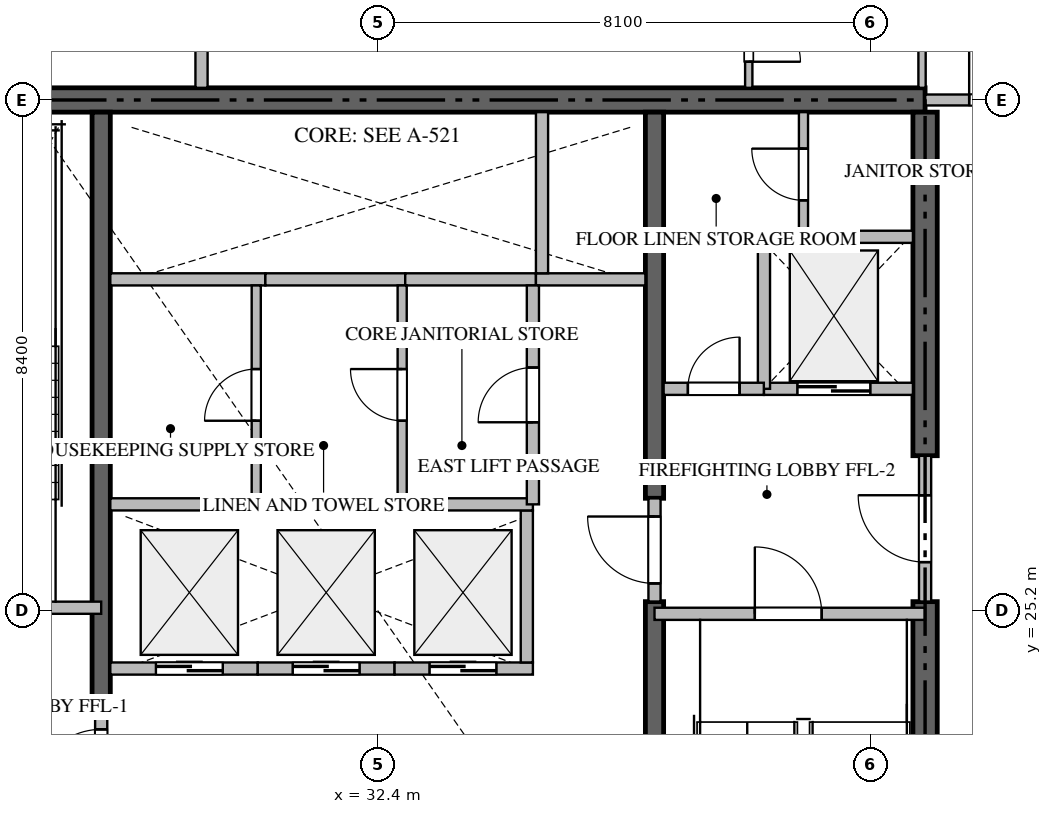
"""IFC4 building model, lengths in metres.
Left out: names, types, materials, properties, quantities, classifications, styles, units other than length and angle.
Written with IfcOpenShell. Run it as: python <this file> out.ifc"""

import sys

from ifc_helpers import new_model, si_unit, direction, frame, frame_2d, origin, place, context, subcontext, project, spatial, rectangle, extrude, source, transform, mapped, element, fill, save


model = new_model("IFC4")
c1 = context("Model", 3, precision=1e-05, world=origin(), true_north=direction((0.0, 1.0)))
c2 = subcontext(c1, "Body", "Model", "MODEL_VIEW")
j1 = project(units=[si_unit("LENGTHUNIT", "METRE"), si_unit("PLANEANGLEUNIT", "RADIAN")], contexts=[c1])
p1 = place(None, origin())
s1 = spatial("IfcSite", under=j1, at=p1, CompositionType="ELEMENT")
p2 = place(p1, origin())
s2 = spatial("IfcBuilding", under=s1, at=p2, CompositionType="ELEMENT")
p3 = place(p2, frame((0.0, 0.0, 138.9)))
s3 = spatial("IfcBuildingStorey", under=s2, at=p3, CompositionType="ELEMENT", Elevation=138.9)
p4 = place(p3, frame((41.4, 33.6, -0.26), z_axis=(0.0, 0.0, 1.0), x_axis=(-1.0, 0.0, 0.0)))
e1 = element("IfcWall", 1, at=p4, inside=s3, PredefinedType="SHEAR", context=c2, shape_type="SweptSolid", body=[
    extrude(rectangle(XDim=18.0, YDim=0.4, at=frame_2d((9.0, 0.0))), origin(), (0.0, 0.0, 1.0), 3.748),
])
p5 = place(p3, frame((41.4, 17.0, -0.26), z_axis=(0.0, 0.0, 1.0), x_axis=(0.0, 1.0, 0.0)))
e2 = element("IfcWall", 2, at=p5, inside=s3, PredefinedType="SHEAR", context=c2, shape_type="SweptSolid", body=[
    extrude(rectangle(XDim=8.35, YDim=0.4, at=frame_2d((4.175, 0.0))), origin(), (0.0, 0.0, 1.0), 3.748),
])
p6 = place(p3, frame((41.4, 27.75, -0.26), z_axis=(0.0, 0.0, 1.0), x_axis=(0.0, 1.0, 0.0)))
e3 = element("IfcWall", 3, at=p6, inside=s3, PredefinedType="SHEAR", context=c2, shape_type="SweptSolid", body=[
    extrude(rectangle(XDim=5.65, YDim=0.4, at=frame_2d((2.825, 0.0))), origin(), (0.0, 0.0, 1.0), 3.748),
])
p7 = place(p3, frame((27.85, 23.55, -0.26), z_axis=(0.0, 0.0, 1.0), x_axis=(0.0, 1.0, 0.0)))
e4 = element("IfcWall", 4, at=p7, inside=s3, PredefinedType="SHEAR", context=c2, shape_type="SweptSolid", body=[
    extrude(rectangle(XDim=9.85, YDim=0.3, at=frame_2d((4.925, 0.0))), origin(), (0.0, 0.0, 1.0), 3.748),
])
p8 = place(p3, frame((36.95, 17.0, -0.26), z_axis=(0.0, 0.0, 1.0), x_axis=(0.0, 1.0, 0.0)))
e5 = element("IfcWall", 5, at=p8, inside=s3, PredefinedType="SHEAR", context=c2, shape_type="SweptSolid", body=[
    extrude(rectangle(XDim=8.35, YDim=0.3, at=frame_2d((4.175, 0.0))), origin(), (0.0, 0.0, 1.0), 3.748),
])
p9 = place(p3, frame((36.95, 27.05, -0.26), z_axis=(0.0, 0.0, 1.0), x_axis=(0.0, 1.0, 0.0)))
e6 = element("IfcWall", 6, at=p9, inside=s3, PredefinedType="SHEAR", context=c2, shape_type="SweptSolid", body=[
    extrude(rectangle(XDim=6.35, YDim=0.3, at=frame_2d((3.175, 0.0))), origin(), (0.0, 0.0, 1.0), 3.748),
])
p10 = place(p3, frame((23.4, 25.25, 0.0), z_axis=(0.0, 0.0, 1.0), x_axis=(1.0, 0.0, 0.0)))
e7 = element("IfcWall", 7, at=p10, inside=s3, PredefinedType="STANDARD", context=c2, shape_type="SweptSolid", body=[
    extrude(rectangle(XDim=4.45, YDim=0.2, at=frame_2d((2.225, 0.0))), origin(), (0.0, 0.0, 1.0), 3.49),
])
p11 = place(p10, frame((1.65, 0.0, 0.0)))
e8 = element("IfcOpeningElement", 8, at=p11, cuts=e7, PredefinedType="OPENING", context=c2, shape_type="SweptSolid", body=[
    extrude(rectangle(XDim=1.1, YDim=2.15, at=frame_2d((0.55, 1.075))), frame((0.0, 0.11, 0.0), z_axis=(0.0, -1.0, 0.0), x_axis=(1.0, 0.0, 0.0)), (0.0, 0.0, 1.0), 0.22),
])
p12 = place(p3, frame((36.95, 25.15, 0.0), z_axis=(0.0, 0.0, 1.0), x_axis=(1.0, 0.0, 0.0)))
e9 = element("IfcWall", 9, at=p12, inside=s3, PredefinedType="STANDARD", context=c2, shape_type="SweptSolid", body=[
    extrude(rectangle(XDim=4.45, YDim=0.2, at=frame_2d((2.225, 0.0))), origin(), (0.0, 0.0, 1.0), 3.49),
])
p13 = place(p12, frame((1.65, 0.0, 0.0)))
e10 = element("IfcOpeningElement", 10, at=p13, cuts=e9, PredefinedType="OPENING", context=c2, shape_type="SweptSolid", body=[
    extrude(rectangle(XDim=1.1, YDim=2.15, at=frame_2d((0.55, 1.075))), frame((0.0, 0.11, 0.0), z_axis=(0.0, -1.0, 0.0), x_axis=(1.0, 0.0, 0.0)), (0.0, 0.0, 1.0), 0.22),
])
p14 = place(p3, frame((38.75, 28.85, 0.0), z_axis=(0.0, 0.0, 1.0), x_axis=(1.0, 0.0, 0.0)))
e11 = element("IfcWall", 11, at=p14, inside=s3, PredefinedType="STANDARD", context=c2, shape_type="SweptSolid", body=[
    extrude(rectangle(XDim=2.45, YDim=0.2, at=frame_2d((1.225, 0.0))), origin(), (0.0, 0.0, 1.0), 3.49),
])
p15 = place(p14, frame((0.55, 0.0, 0.0)))
e12 = element("IfcOpeningElement", 12, at=p15, cuts=e11, PredefinedType="OPENING", context=c2, shape_type="SweptSolid", body=[
    extrude(rectangle(XDim=1.2, YDim=2.2, at=frame_2d((0.6, 1.1))), frame((0.0, 0.11, 0.0), z_axis=(0.0, -1.0, 0.0), x_axis=(1.0, 0.0, 0.0)), (0.0, 0.0, 1.0), 0.22),
])
p16 = place(p3, frame((28.0, 24.25, 0.0), z_axis=(0.0, 0.0, 1.0), x_axis=(1.0, 0.0, 0.0)))
e13 = element("IfcWall", 13, at=p16, inside=s3, PredefinedType="STANDARD", context=c2, shape_type="SweptSolid", body=[
    extrude(rectangle(XDim=2.425, YDim=0.2, at=frame_2d((1.212, 0.0))), origin(), (0.0, 0.0, 1.0), 3.49),
])
p17 = place(p16, frame((0.75, 0.0, 0.0)))
e14 = element("IfcOpeningElement", 14, at=p17, cuts=e13, PredefinedType="OPENING", context=c2, shape_type="SweptSolid", body=[
    extrude(rectangle(XDim=1.1, YDim=2.2, at=frame_2d((0.55, 1.1))), frame((0.0, 0.11, 0.0), z_axis=(0.0, -1.0, 0.0), x_axis=(1.0, 0.0, 0.0)), (0.0, 0.0, 1.0), 0.22),
])
p18 = place(p3, frame((30.425, 24.25, 0.0), z_axis=(0.0, 0.0, 1.0), x_axis=(1.0, 0.0, 0.0)))
e15 = element("IfcWall", 15, at=p18, inside=s3, PredefinedType="STANDARD", context=c2, shape_type="SweptSolid", body=[
    extrude(rectangle(XDim=2.25, YDim=0.2, at=frame_2d((1.125, 0.0))), origin(), (0.0, 0.0, 1.0), 3.49),
])
p19 = place(p18, frame((0.575, 0.0, 0.0)))
e16 = element("IfcOpeningElement", 16, at=p19, cuts=e15, PredefinedType="OPENING", context=c2, shape_type="SweptSolid", body=[
    extrude(rectangle(XDim=1.1, YDim=2.2, at=frame_2d((0.55, 1.1))), frame((0.0, 0.11, 0.0), z_axis=(0.0, -1.0, 0.0), x_axis=(1.0, 0.0, 0.0)), (0.0, 0.0, 1.0), 0.22),
])
p20 = place(p3, frame((32.675, 24.25, 0.0), z_axis=(0.0, 0.0, 1.0), x_axis=(1.0, 0.0, 0.0)))
e17 = element("IfcWall", 17, at=p20, inside=s3, PredefinedType="STANDARD", context=c2, shape_type="SweptSolid", body=[
    extrude(rectangle(XDim=2.275, YDim=0.2, at=frame_2d((1.137, 0.0))), origin(), (0.0, 0.0, 1.0), 3.49),
])
p21 = place(p20, frame((0.575, 0.0, 0.0)))
e18 = element("IfcOpeningElement", 18, at=p21, cuts=e17, PredefinedType="OPENING", context=c2, shape_type="SweptSolid", body=[
    extrude(rectangle(XDim=1.1, YDim=2.2, at=frame_2d((0.55, 1.1))), frame((0.0, 0.11, 0.0), z_axis=(0.0, -1.0, 0.0), x_axis=(1.0, 0.0, 0.0)), (0.0, 0.0, 1.0), 0.22),
])
p22 = place(p3, frame((34.85, 24.35, 0.0), z_axis=(0.0, 0.0, 1.0), x_axis=(0.0, 1.0, 0.0)))
e19 = element("IfcWall", 19, at=p22, inside=s3, PredefinedType="STANDARD", context=c2, shape_type="SweptSolid", body=[
    extrude(rectangle(XDim=2.5, YDim=0.2, at=frame_2d((1.25, 0.0))), origin(), (0.0, 0.0, 1.0), 3.49),
])
p23 = place(p3, frame((28.0, 30.65, 0.0), z_axis=(0.0, 0.0, 1.0), x_axis=(1.0, 0.0, 0.0)))
e20 = element("IfcWall", 20, at=p23, inside=s3, PredefinedType="STANDARD", context=c2, shape_type="SweptSolid", body=[
    extrude(rectangle(XDim=2.55, YDim=0.2, at=frame_2d((1.275, 0.0))), origin(), (0.0, 0.0, 1.0), 3.49),
])
p24 = place(p3, frame((30.55, 30.65, 0.0), z_axis=(0.0, 0.0, 1.0), x_axis=(1.0, 0.0, 0.0)))
e21 = element("IfcWall", 21, at=p24, inside=s3, PredefinedType="STANDARD", context=c2, shape_type="SweptSolid", body=[
    extrude(rectangle(XDim=2.3, YDim=0.2, at=frame_2d((1.15, 0.0))), origin(), (0.0, 0.0, 1.0), 3.49),
])
p25 = place(p3, frame((32.85, 30.65, 0.0), z_axis=(0.0, 0.0, 1.0), x_axis=(1.0, 0.0, 0.0)))
e22 = element("IfcWall", 22, at=p25, inside=s3, PredefinedType="STANDARD", context=c2, shape_type="SweptSolid", body=[
    extrude(rectangle(XDim=2.15, YDim=0.2, at=frame_2d((1.075, 0.0))), origin(), (0.0, 0.0, 1.0), 3.49),
])
p26 = place(p3, frame((35.0, 30.65, 0.0), z_axis=(0.0, 0.0, 1.0), x_axis=(1.0, 0.0, 0.0)))
e23 = element("IfcWall", 23, at=p26, inside=s3, PredefinedType="STANDARD", context=c2, shape_type="SweptSolid", body=[
    extrude(rectangle(XDim=1.8, YDim=0.2, at=frame_2d((0.9, 0.0))), origin(), (0.0, 0.0, 1.0), 3.49),
])
p27 = place(p3, frame((35.1, 30.75, 0.0), z_axis=(0.0, 0.0, 1.0), x_axis=(0.0, 1.0, 0.0)))
e24 = element("IfcWall", 24, at=p27, inside=s3, PredefinedType="STANDARD", context=c2, shape_type="SweptSolid", body=[
    extrude(rectangle(XDim=2.65, YDim=0.2, at=frame_2d((1.325, 0.0))), origin(), (0.0, 0.0, 1.0), 3.49),
])
p28 = place(p3, frame((38.75, 28.85, 0.0), z_axis=(0.0, 0.0, 1.0), x_axis=(0.0, 1.0, 0.0)))
e25 = element("IfcWall", 25, at=p28, inside=s3, PredefinedType="STANDARD", context=c2, shape_type="SweptSolid", body=[
    extrude(rectangle(XDim=2.5, YDim=0.2, at=frame_2d((1.25, 0.0))), origin(), (0.0, 0.0, 1.0), 3.49),
])
p29 = place(p3, frame((38.75, 31.35, 0.0), z_axis=(0.0, 0.0, 1.0), x_axis=(1.0, 0.0, 0.0)))
e26 = element("IfcWall", 26, at=p29, inside=s3, PredefinedType="STANDARD", context=c2, shape_type="SweptSolid", body=[
    extrude(rectangle(XDim=2.45, YDim=0.2, at=frame_2d((1.225, 0.0))), origin(), (0.0, 0.0, 1.0), 3.49),
])
p30 = place(p3, frame((37.1, 28.85, 0.0), z_axis=(0.0, 0.0, 1.0), x_axis=(1.0, 0.0, 0.0)))
e27 = element("IfcWall", 27, at=p30, inside=s3, PredefinedType="STANDARD", context=c2, shape_type="SweptSolid", body=[
    extrude(rectangle(XDim=1.648, YDim=0.2, at=frame_2d((0.824, 0.0))), origin(), (0.0, 0.0, 1.0), 3.49),
])
p31 = place(p30, frame((0.399, 0.0, 0.0)))
e28 = element("IfcOpeningElement", 28, at=p31, cuts=e27, PredefinedType="OPENING", context=c2, shape_type="SweptSolid", body=[
    extrude(rectangle(XDim=0.85, YDim=2.1, at=frame_2d((0.425, 1.05))), frame((0.0, 0.11, 0.0), z_axis=(0.0, -1.0, 0.0), x_axis=(1.0, 0.0, 0.0)), (0.0, 0.0, 1.0), 0.22),
])
p32 = place(p3, frame((41.4, 25.352, 0.0), z_axis=(0.0, 0.0, 1.0), x_axis=(0.0, 1.0, 0.0)))
e29 = element("IfcWall", 29, at=p32, inside=s3, PredefinedType="STANDARD", context=c2, shape_type="SweptSolid", body=[
    extrude(rectangle(XDim=2.396, YDim=0.2, at=frame_2d((1.198, 0.0))), origin(), (0.0, 0.0, 1.0), 3.49),
])
p33 = place(p32, frame((0.648, 0.0, 0.0)))
e30 = element("IfcOpeningElement", 30, at=p33, cuts=e29, PredefinedType="OPENING", context=c2, shape_type="SweptSolid", body=[
    extrude(rectangle(XDim=1.1, YDim=2.15, at=frame_2d((0.55, 1.075))), frame((0.0, 0.11, 0.0), z_axis=(0.0, -1.0, 0.0), x_axis=(1.0, 0.0, 0.0)), (0.0, 0.0, 1.0), 0.22),
])
p34 = place(p3, frame((27.85, 21.852, 0.0), z_axis=(0.0, 0.0, 1.0), x_axis=(0.0, 1.0, 0.0)))
e31 = element("IfcWall", 31, at=p34, inside=s3, PredefinedType="STANDARD", context=c2, shape_type="SweptSolid", body=[
    extrude(rectangle(XDim=1.696, YDim=0.2, at=frame_2d((0.848, 0.0))), origin(), (0.0, 0.0, 1.0), 3.49),
])
p35 = place(p34, frame((0.298, 0.0, 0.0)))
e32 = element("IfcOpeningElement", 32, at=p35, cuts=e31, PredefinedType="OPENING", context=c2, shape_type="SweptSolid", body=[
    extrude(rectangle(XDim=1.1, YDim=2.15, at=frame_2d((0.55, 1.075))), frame((0.0, 0.11, 0.0), z_axis=(0.0, -1.0, 0.0), x_axis=(1.0, 0.0, 0.0)), (0.0, 0.0, 1.0), 0.22),
])
p36 = place(p3, frame((36.95, 25.352, 0.0), z_axis=(0.0, 0.0, 1.0), x_axis=(0.0, 1.0, 0.0)))
e33 = element("IfcWall", 33, at=p36, inside=s3, PredefinedType="STANDARD", context=c2, shape_type="SweptSolid", body=[
    extrude(rectangle(XDim=1.696, YDim=0.2, at=frame_2d((0.848, 0.0))), origin(), (0.0, 0.0, 1.0), 3.49),
])
p37 = place(p36, frame((0.298, 0.0, 0.0)))
e34 = element("IfcOpeningElement", 34, at=p37, cuts=e33, PredefinedType="OPENING", context=c2, shape_type="SweptSolid", body=[
    extrude(rectangle(XDim=1.1, YDim=2.15, at=frame_2d((0.55, 1.075))), frame((0.0, 0.11, 0.0), z_axis=(0.0, -1.0, 0.0), x_axis=(1.0, 0.0, 0.0)), (0.0, 0.0, 1.0), 0.22),
])
p38 = place(p3, frame((28.0, 26.95, 0.0), z_axis=(0.0, 0.0, 1.0), x_axis=(1.0, 0.0, 0.0)))
e35 = element("IfcWall", 35, at=p38, inside=s3, PredefinedType="STANDARD", context=c2, shape_type="SweptSolid", body=[
    extrude(rectangle(XDim=6.95, YDim=0.2, at=frame_2d((3.475, 0.0))), origin(), (0.0, 0.0, 1.0), 3.49),
])
p39 = place(p3, frame((39.4, 31.35, 0.0), z_axis=(0.0, 0.0, 1.0), x_axis=(0.0, 1.0, 0.0)))
e36 = element("IfcWall", 36, at=p39, inside=s3, PredefinedType="PARTITIONING", context=c2, shape_type="SweptSolid", body=[
    extrude(rectangle(XDim=2.05, YDim=0.15, at=frame_2d((1.025, 0.0))), origin(), (0.0, 0.0, 1.0), 3.49),
])
p40 = place(p39, frame((0.6, 0.0, 0.0)))
e37 = element("IfcOpeningElement", 37, at=p40, cuts=e36, PredefinedType="OPENING", context=c2, shape_type="SweptSolid", body=[
    extrude(rectangle(XDim=0.85, YDim=2.1, at=frame_2d((0.425, 1.05))), frame((0.0, 0.085, 0.0), z_axis=(0.0, -1.0, 0.0), x_axis=(1.0, 0.0, 0.0)), (0.0, 0.0, 1.0), 0.17),
])
p41 = place(p3, frame((34.95, 26.95, 0.0), z_axis=(0.0, 0.0, 1.0), x_axis=(0.0, 1.0, 0.0)))
e38 = element("IfcWall", 38, at=p41, inside=s3, PredefinedType="STANDARD", context=c2, shape_type="SweptSolid", body=[
    extrude(rectangle(XDim=3.6, YDim=0.2, at=frame_2d((1.8, 0.0))), origin(), (0.0, 0.0, 1.0), 3.49),
])
p42 = place(p41, frame((1.35, 0.0, 0.0)))
e39 = element("IfcOpeningElement", 39, at=p42, cuts=e38, PredefinedType="OPENING", context=c2, shape_type="SweptSolid", body=[
    extrude(rectangle(XDim=0.9, YDim=2.1, at=frame_2d((0.45, 1.05))), frame((0.0, 0.11, 0.0), z_axis=(0.0, -1.0, 0.0), x_axis=(1.0, 0.0, 0.0)), (0.0, 0.0, 1.0), 0.22),
])
p43 = place(p3, frame((32.8, 26.95, 0.0), z_axis=(0.0, 0.0, 1.0), x_axis=(0.0, 1.0, 0.0)))
e40 = element("IfcWall", 40, at=p43, inside=s3, PredefinedType="PARTITIONING", context=c2, shape_type="SweptSolid", body=[
    extrude(rectangle(XDim=3.6, YDim=0.15, at=frame_2d((1.8, 0.0))), origin(), (0.0, 0.0, 1.0), 3.49),
])
p44 = place(p43, frame((1.375, 0.0, 0.0)))
e41 = element("IfcOpeningElement", 41, at=p44, cuts=e40, PredefinedType="OPENING", context=c2, shape_type="SweptSolid", body=[
    extrude(rectangle(XDim=0.85, YDim=2.1, at=frame_2d((0.425, 1.05))), frame((0.0, 0.085, 0.0), z_axis=(0.0, -1.0, 0.0), x_axis=(1.0, 0.0, 0.0)), (0.0, 0.0, 1.0), 0.17),
])
p45 = place(p3, frame((30.4, 26.95, 0.0), z_axis=(0.0, 0.0, 1.0), x_axis=(0.0, 1.0, 0.0)))
e42 = element("IfcWall", 42, at=p45, inside=s3, PredefinedType="PARTITIONING", context=c2, shape_type="SweptSolid", body=[
    extrude(rectangle(XDim=3.6, YDim=0.15, at=frame_2d((1.8, 0.0))), origin(), (0.0, 0.0, 1.0), 3.49),
])
p46 = place(p45, frame((1.375, 0.0, 0.0)))
e43 = element("IfcOpeningElement", 43, at=p46, cuts=e42, PredefinedType="OPENING", context=c2, shape_type="SweptSolid", body=[
    extrude(rectangle(XDim=0.85, YDim=2.1, at=frame_2d((0.425, 1.05))), frame((0.0, 0.085, 0.0), z_axis=(0.0, -1.0, 0.0), x_axis=(1.0, 0.0, 0.0)), (0.0, 0.0, 1.0), 0.17),
])
p47 = place(p3, frame((29.5, 33.8, 0.0), z_axis=(0.0, 0.0, 1.0), x_axis=(0.0, 1.0, 0.0)))
e44 = element("IfcWall", 44, at=p47, inside=s3, PredefinedType="PARTITIONING", context=c2, shape_type="SweptSolid", body=[
    extrude(rectangle(XDim=15.118, YDim=0.2, at=frame_2d((7.559, 0.0))), origin(), (0.0, 0.0, 1.0), 3.49),
])
p48 = place(p3, frame((41.402, 33.6, 0.0), z_axis=(0.0, 0.0, 1.0), x_axis=(1.0, 0.0, 0.0)))
e45 = element("IfcWall", 45, at=p48, inside=s3, PredefinedType="PARTITIONING", context=c2, shape_type="SweptSolid", body=[
    extrude(rectangle(XDim=2.446, YDim=0.18, at=frame_2d((1.223, 0.0))), origin(), (0.0, 0.0, 1.0), 3.49),
])
p49 = place(p48, frame((0.723, 0.0, 0.0)))
e46 = element("IfcOpeningElement", 46, at=p49, cuts=e45, PredefinedType="OPENING", context=c2, shape_type="SweptSolid", body=[
    extrude(rectangle(XDim=1.0, YDim=2.15, at=frame_2d((0.5, 1.075))), frame((0.0, 0.1, 0.0), z_axis=(0.0, -1.0, 0.0), x_axis=(1.0, 0.0, 0.0)), (0.0, 0.0, 1.0), 0.2),
])
p50 = place(p3, frame((41.35, 36.35, 0.0), z_axis=(0.0, 0.0, 1.0), x_axis=(0.0, -1.0, 0.0)))
e47 = element("IfcWall", 47, at=p50, inside=s3, PredefinedType="PARTITIONING", context=c2, shape_type="SweptSolid", body=[
    extrude(rectangle(XDim=2.55, YDim=0.12, at=frame_2d((1.275, 0.0))), origin(), (0.0, 0.0, 1.0), 3.49),
])
p51 = place(p3, frame((38.5, 35.648, 0.0), z_axis=(0.0, 0.0, 1.0), x_axis=(0.0, -1.0, 0.0)))
e48 = element("IfcWall", 48, at=p51, inside=s3, PredefinedType="PARTITIONING", context=c2, shape_type="SweptSolid", body=[
    extrude(rectangle(XDim=1.848, YDim=0.12, at=frame_2d((0.924, 0.0))), origin(), (0.0, 0.0, 1.0), 3.49),
])
p52 = place(p51, frame((0.569, 0.0, 0.0)))
e49 = element("IfcOpeningElement", 49, at=p52, cuts=e48, PredefinedType="OPENING", context=c2, shape_type="SweptSolid", body=[
    extrude(rectangle(XDim=0.85, YDim=2.1, at=frame_2d((0.425, 1.05))), frame((0.0, 0.07, 0.0), z_axis=(0.0, -1.0, 0.0), x_axis=(1.0, 0.0, 0.0)), (0.0, 0.0, 1.0), 0.14),
])
m1 = source(origin(), c2, "Body", "SweptSolid", [
    extrude(rectangle(XDim=1.1, YDim=2.15, at=frame_2d((0.55, 1.075))), frame((0.0, 0.025, 0.0), z_axis=(0.0, -1.0, 0.0), x_axis=(1.0, 0.0, 0.0)), (0.0, 0.0, 1.0), 0.05),
])
p53 = place(p13, origin())
e50 = element("IfcDoor", 50, at=p53, inside=s3, OperationType="SINGLE_SWING_LEFT", PredefinedType="DOOR", context=c2, shape_type="MappedRepresentation", body=[
    mapped(m1, transform((0.0, 0.0, 0.0), scale=1.0)),
])
fill(e10, e50)
m2 = source(origin(), c2, "Body", "SweptSolid", [
    extrude(rectangle(XDim=1.2, YDim=2.2, at=frame_2d((0.6, 1.1))), frame((0.0, 0.025, 0.0), z_axis=(0.0, -1.0, 0.0), x_axis=(1.0, 0.0, 0.0)), (0.0, 0.0, 1.0), 0.05),
])
p54 = place(p15, origin())
e51 = element("IfcDoor", 51, at=p54, inside=s3, OperationType="DOUBLE_DOOR_SLIDING", PredefinedType="DOOR", context=c2, shape_type="MappedRepresentation", body=[
    mapped(m2, transform((0.0, 0.0, 0.0), scale=1.0)),
])
fill(e12, e51)
m3 = source(origin(), c2, "Body", "SweptSolid", [
    extrude(rectangle(XDim=1.1, YDim=2.2, at=frame_2d((0.55, 1.1))), frame((0.0, 0.025, 0.0), z_axis=(0.0, -1.0, 0.0), x_axis=(1.0, 0.0, 0.0)), (0.0, 0.0, 1.0), 0.05),
])
p55 = place(p17, origin())
e52 = element("IfcDoor", 52, at=p55, inside=s3, OperationType="DOUBLE_DOOR_SLIDING", PredefinedType="DOOR", context=c2, shape_type="MappedRepresentation", body=[
    mapped(m3, transform((0.0, 0.0, 0.0), scale=1.0)),
])
fill(e14, e52)
p56 = place(p19, origin())
e53 = element("IfcDoor", 53, at=p56, inside=s3, OperationType="DOUBLE_DOOR_SLIDING", PredefinedType="DOOR", context=c2, shape_type="MappedRepresentation", body=[
    mapped(m3, transform((0.0, 0.0, 0.0), scale=1.0)),
])
fill(e16, e53)
p57 = place(p21, origin())
e54 = element("IfcDoor", 54, at=p57, inside=s3, OperationType="DOUBLE_DOOR_SLIDING", PredefinedType="DOOR", context=c2, shape_type="MappedRepresentation", body=[
    mapped(m3, transform((0.0, 0.0, 0.0), scale=1.0)),
])
fill(e18, e54)
m4 = source(origin(), c2, "Body", "SweptSolid", [
    extrude(rectangle(XDim=0.85, YDim=2.1, at=frame_2d((0.425, 1.05))), frame((0.0, 0.025, 0.0), z_axis=(0.0, -1.0, 0.0), x_axis=(1.0, 0.0, 0.0)), (0.0, 0.0, 1.0), 0.05),
])
p58 = place(p31, origin())
e55 = element("IfcDoor", 55, at=p58, inside=s3, OperationType="SINGLE_SWING_RIGHT", PredefinedType="DOOR", context=c2, shape_type="MappedRepresentation", body=[
    mapped(m4, transform((0.0, 0.0, 0.0), scale=1.0)),
])
fill(e28, e55)
p59 = place(p33, origin())
e56 = element("IfcDoor", 56, at=p59, inside=s3, OperationType="SINGLE_SWING_RIGHT", PredefinedType="DOOR", context=c2, shape_type="MappedRepresentation", body=[
    mapped(m1, transform((0.0, 0.0, 0.0), scale=1.0)),
])
fill(e30, e56)
p60 = place(p35, origin())
e57 = element("IfcDoor", 57, at=p60, inside=s3, OperationType="SINGLE_SWING_LEFT", PredefinedType="DOOR", context=c2, shape_type="MappedRepresentation", body=[
    mapped(m1, transform((0.0, 0.0, 0.0), scale=1.0)),
])
fill(e32, e57)
p61 = place(p37, origin())
e58 = element("IfcDoor", 58, at=p61, inside=s3, OperationType="SINGLE_SWING_RIGHT", PredefinedType="DOOR", context=c2, shape_type="MappedRepresentation", body=[
    mapped(m1, transform((0.0, 0.0, 0.0), scale=1.0)),
])
fill(e34, e58)
p62 = place(p40, origin())
e59 = element("IfcDoor", 59, at=p62, inside=s3, OperationType="SINGLE_SWING_RIGHT", PredefinedType="DOOR", context=c2, shape_type="MappedRepresentation", body=[
    mapped(m4, transform((0.0, 0.0, 0.0), scale=1.0)),
])
fill(e37, e59)
m5 = source(origin(), c2, "Body", "SweptSolid", [
    extrude(rectangle(XDim=0.9, YDim=2.1, at=frame_2d((0.45, 1.05))), frame((0.0, 0.025, 0.0), z_axis=(0.0, -1.0, 0.0), x_axis=(1.0, 0.0, 0.0)), (0.0, 0.0, 1.0), 0.05),
])
p63 = place(p42, origin())
e60 = element("IfcDoor", 60, at=p63, inside=s3, OperationType="SINGLE_SWING_LEFT", PredefinedType="DOOR", context=c2, shape_type="MappedRepresentation", body=[
    mapped(m5, transform((0.0, 0.0, 0.0), scale=1.0)),
])
fill(e39, e60)
p64 = place(p44, origin())
e61 = element("IfcDoor", 61, at=p64, inside=s3, OperationType="SINGLE_SWING_RIGHT", PredefinedType="DOOR", context=c2, shape_type="MappedRepresentation", body=[
    mapped(m4, transform((0.0, 0.0, 0.0), scale=1.0)),
])
fill(e41, e61)
p65 = place(p46, origin())
e62 = element("IfcDoor", 62, at=p65, inside=s3, OperationType="SINGLE_SWING_LEFT", PredefinedType="DOOR", context=c2, shape_type="MappedRepresentation", body=[
    mapped(m4, transform((0.0, 0.0, 0.0), scale=1.0)),
])
fill(e43, e62)
m6 = source(origin(), c2, "Body", "SweptSolid", [
    extrude(rectangle(XDim=1.0, YDim=2.15, at=frame_2d((0.5, 1.075))), frame((0.0, 0.025, 0.0), z_axis=(0.0, -1.0, 0.0), x_axis=(1.0, 0.0, 0.0)), (0.0, 0.0, 1.0), 0.05),
])
p66 = place(p49, origin())
e63 = element("IfcDoor", 63, at=p66, inside=s3, OperationType="SINGLE_SWING_LEFT", PredefinedType="DOOR", context=c2, shape_type="MappedRepresentation", body=[
    mapped(m6, transform((0.0, 0.0, 0.0), scale=1.0)),
])
fill(e46, e63)
p67 = place(p52, origin())
e64 = element("IfcDoor", 64, at=p67, inside=s3, OperationType="SINGLE_SWING_RIGHT", PredefinedType="DOOR", context=c2, shape_type="MappedRepresentation", body=[
    mapped(m4, transform((0.0, 0.0, 0.0), scale=1.0)),
])
fill(e49, e64)
save(model, sys.argv[1])
